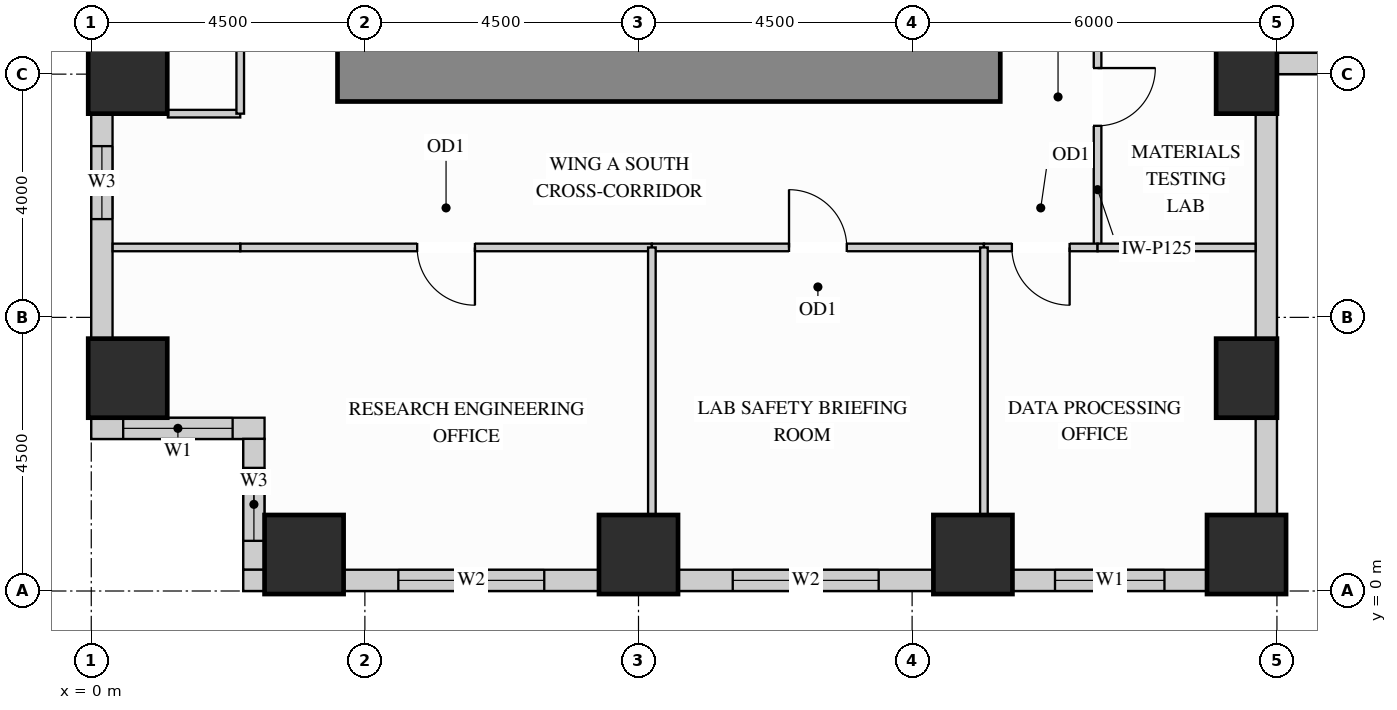
"""IFC4 building model, lengths in metres.
Left out: names, types, materials, properties, quantities, classifications, styles, units other than length and angle.
Written with IfcOpenShell. Run it as: python <this file> out.ifc"""

import sys

from ifc_helpers import new_model, si_unit, direction, frame, frame_2d, origin, origin_2d, place, context, subcontext, project, spatial, rectangle, extrude, source, transform, mapped, element, fill, save


model = new_model("IFC4")
c1 = context("Model", 3, precision=1e-05, world=origin(), true_north=direction((0.0, 1.0)))
c2 = subcontext(c1, "Body", "Model", "MODEL_VIEW")
j1 = project(units=[si_unit("LENGTHUNIT", "METRE"), si_unit("PLANEANGLEUNIT", "RADIAN")], contexts=[c1])
p1 = place(None, origin())
s1 = spatial("IfcSite", under=j1, at=p1, CompositionType="ELEMENT")
p2 = place(p1, origin())
s2 = spatial("IfcBuilding", under=s1, at=p2, CompositionType="ELEMENT")
p3 = place(p2, frame((0.0, 0.0, 36.9)))
s3 = spatial("IfcBuildingStorey", under=s2, at=p3, CompositionType="ELEMENT", Elevation=36.9)
m1 = source(origin(), c2, "Body", "SweptSolid", [
    extrude(rectangle(XDim=1.0, YDim=1.3, at=origin_2d()), origin(), (0.0, 0.0, 1.0), 3.38),
])
for number, where, z_axis, x_axis in (
    (1, (19.0, 3.5, 0.0), (0.0, 0.0, 1.0), (1.0, 0.0, 0.0)),
    (2, (19.0, 8.5, 0.0), (0.0, 0.0, 1.0), (1.0, 0.0, 0.0)),
):
    element("IfcColumn", number, at=place(p3, frame(where, z_axis=z_axis, x_axis=x_axis)), inside=s3, PredefinedType="COLUMN", context=c2, shape_type="MappedRepresentation", body=[
        mapped(m1, transform((0.0, 0.0, 0.0), x_axis=(1.0, 0.0, 0.0), y_axis=(0.0, 1.0, 0.0), z_axis=(0.0, 0.0, 1.0))),
    ])
m2 = source(origin(), c2, "Body", "SweptSolid", [
    extrude(rectangle(XDim=1.3, YDim=1.3, at=origin_2d()), origin(), (0.0, 0.0, 1.0), 3.38),
])
for number, where, z_axis, x_axis in (
    (3, (14.5, 0.6, 0.0), (0.0, 0.0, 1.0), (1.0, 0.0, 0.0)),
    (4, (19.0, 0.6, 0.0), (0.0, 0.0, 1.0), (1.0, 0.0, 0.0)),
    (5, (3.5, 0.6, 0.0), (0.0, 0.0, 1.0), (1.0, 0.0, 0.0)),
    (6, (9.0, 0.6, 0.0), (0.0, 0.0, 1.0), (1.0, 0.0, 0.0)),
    (7, (0.6, 3.5, 0.0), (0.0, 0.0, 1.0), (1.0, 0.0, 0.0)),
    (8, (0.6, 8.5, 0.0), (0.0, 0.0, 1.0), (1.0, 0.0, 0.0)),
):
    element("IfcColumn", number, at=place(p3, frame(where, z_axis=z_axis, x_axis=x_axis)), inside=s3, PredefinedType="COLUMN", context=c2, shape_type="MappedRepresentation", body=[
        mapped(m2, transform((0.0, 0.0, 0.0), x_axis=(1.0, 0.0, 0.0), y_axis=(0.0, 1.0, 0.0), z_axis=(0.0, 0.0, 1.0))),
    ])
m3 = source(origin(), c2, "Body", "SweptSolid", [
    extrude(rectangle(XDim=10.9, YDim=0.9, at=frame_2d((5.45, 0.0))), origin(), (0.0, 0.0, 1.0), 3.38),
])
p4 = place(p3, frame((4.05, 8.5, 0.0), z_axis=(0.0, 0.0, 1.0), x_axis=(1.0, 0.0, 0.0)))
e9 = element("IfcWall", 9, at=p4, inside=s3, PredefinedType="SHEAR", context=c2, shape_type="MappedRepresentation", body=[
    mapped(m3, transform((0.0, 0.0, 0.0), x_axis=(1.0, 0.0, 0.0), y_axis=(0.0, 1.0, 0.0), z_axis=(0.0, 0.0, 1.0))),
])
p5 = place(p3, frame((0.175, 7.852, 0.0), z_axis=(0.0, 0.0, 1.0), x_axis=(0.0, -1.0, 0.0)))
e10 = element("IfcWall", 10, at=p5, inside=s3, PredefinedType="SOLIDWALL", context=c2, shape_type="SweptSolid", body=[
    extrude(rectangle(XDim=3.704, YDim=0.35, at=frame_2d((1.852, 0.0))), origin(), (0.0, 0.0, 1.0), 2.51),
])
p6 = place(p5, frame((0.536, 0.0, 0.78)))
e11 = element("IfcOpeningElement", 11, at=p6, cuts=e10, PredefinedType="OPENING", context=c2, shape_type="SweptSolid", body=[
    extrude(rectangle(XDim=1.2, YDim=1.55, at=frame_2d((0.6, 0.775))), frame((0.0, 0.185, 0.0), z_axis=(0.0, -1.0, 0.0), x_axis=(1.0, 0.0, 0.0)), (0.0, 0.0, 1.0), 0.37),
])
p7 = place(p3, frame((0.0, 2.675, 0.0), z_axis=(0.0, 0.0, 1.0), x_axis=(1.0, 0.0, 0.0)))
e12 = element("IfcWall", 12, at=p7, inside=s3, PredefinedType="SOLIDWALL", context=c2, shape_type="SweptSolid", body=[
    extrude(rectangle(XDim=2.85, YDim=0.35, at=frame_2d((1.425, 0.0))), origin(), (0.0, 0.0, 1.0), 3.365),
])
p8 = place(p7, frame((0.525, 0.0, 0.78)))
e13 = element("IfcOpeningElement", 13, at=p8, cuts=e12, PredefinedType="OPENING", context=c2, shape_type="SweptSolid", body=[
    extrude(rectangle(XDim=1.8, YDim=2.1, at=frame_2d((0.9, 1.05))), frame((0.0, 0.185, 0.0), z_axis=(0.0, -1.0, 0.0), x_axis=(1.0, 0.0, 0.0)), (0.0, 0.0, 1.0), 0.37),
])
p9 = place(p3, frame((2.675, 2.502, 0.0), z_axis=(0.0, 0.0, 1.0), x_axis=(0.0, -1.0, 0.0)))
e14 = element("IfcWall", 14, at=p9, inside=s3, PredefinedType="SOLIDWALL", context=c2, shape_type="SweptSolid", body=[
    extrude(rectangle(XDim=2.154, YDim=0.35, at=frame_2d((1.077, 0.0))), origin(), (0.0, 0.0, 1.0), 3.365),
])
p10 = place(p9, frame((0.477, 0.0, 0.78)))
e15 = element("IfcOpeningElement", 15, at=p10, cuts=e14, PredefinedType="OPENING", context=c2, shape_type="SweptSolid", body=[
    extrude(rectangle(XDim=1.2, YDim=2.1, at=frame_2d((0.6, 1.05))), frame((0.0, 0.185, 0.0), z_axis=(0.0, -1.0, 0.0), x_axis=(1.0, 0.0, 0.0)), (0.0, 0.0, 1.0), 0.37),
])
m4 = source(origin(), c2, "Body", "SweptSolid", [
    extrude(rectangle(XDim=0.352, YDim=0.35, at=frame_2d((0.176, 0.0))), origin(), (0.0, 0.0, 1.0), 3.365),
])
p11 = place(p3, frame((2.5, 0.175, 0.0), z_axis=(0.0, 0.0, 1.0), x_axis=(1.0, 0.0, 0.0)))
e16 = element("IfcWall", 16, at=p11, inside=s3, PredefinedType="SOLIDWALL", context=c2, shape_type="MappedRepresentation", body=[
    mapped(m4, transform((0.0, 0.0, 0.0), x_axis=(1.0, 0.0, 0.0), y_axis=(0.0, 1.0, 0.0), z_axis=(0.0, 0.0, 1.0))),
])
p12 = place(p3, frame((4.148, 0.175, 0.0), z_axis=(0.0, 0.0, 1.0), x_axis=(1.0, 0.0, 0.0)))
e17 = element("IfcWall", 17, at=p12, inside=s3, PredefinedType="SOLIDWALL", context=c2, shape_type="SweptSolid", body=[
    extrude(rectangle(XDim=4.204, YDim=0.35, at=frame_2d((2.102, 0.0))), origin(), (0.0, 0.0, 1.0), 2.51),
])
p13 = place(p12, frame((0.902, 0.0, 0.78)))
e18 = element("IfcOpeningElement", 18, at=p13, cuts=e17, PredefinedType="OPENING", context=c2, shape_type="SweptSolid", body=[
    extrude(rectangle(XDim=2.4, YDim=1.55, at=frame_2d((1.2, 0.775))), frame((0.0, 0.185, 0.0), z_axis=(0.0, -1.0, 0.0), x_axis=(1.0, 0.0, 0.0)), (0.0, 0.0, 1.0), 0.37),
])
p14 = place(p3, frame((9.648, 0.175, 0.0), z_axis=(0.0, 0.0, 1.0), x_axis=(1.0, 0.0, 0.0)))
e19 = element("IfcWall", 19, at=p14, inside=s3, PredefinedType="SOLIDWALL", context=c2, shape_type="SweptSolid", body=[
    extrude(rectangle(XDim=4.204, YDim=0.35, at=frame_2d((2.102, 0.0))), origin(), (0.0, 0.0, 1.0), 2.51),
])
p15 = place(p14, frame((0.902, 0.0, 0.78)))
e20 = element("IfcOpeningElement", 20, at=p15, cuts=e19, PredefinedType="OPENING", context=c2, shape_type="SweptSolid", body=[
    extrude(rectangle(XDim=2.4, YDim=1.55, at=frame_2d((1.2, 0.775))), frame((0.0, 0.185, 0.0), z_axis=(0.0, -1.0, 0.0), x_axis=(1.0, 0.0, 0.0)), (0.0, 0.0, 1.0), 0.37),
])
p16 = place(p3, frame((15.148, 0.175, 0.0), z_axis=(0.0, 0.0, 1.0), x_axis=(1.0, 0.0, 0.0)))
e21 = element("IfcWall", 21, at=p16, inside=s3, PredefinedType="SOLIDWALL", context=c2, shape_type="SweptSolid", body=[
    extrude(rectangle(XDim=3.204, YDim=0.35, at=frame_2d((1.602, 0.0))), origin(), (0.0, 0.0, 1.0), 2.51),
])
p17 = place(p16, frame((0.702, 0.0, 0.78)))
e22 = element("IfcOpeningElement", 22, at=p17, cuts=e21, PredefinedType="OPENING", context=c2, shape_type="SweptSolid", body=[
    extrude(rectangle(XDim=1.8, YDim=1.55, at=frame_2d((0.9, 0.775))), frame((0.0, 0.185, 0.0), z_axis=(0.0, -1.0, 0.0), x_axis=(1.0, 0.0, 0.0)), (0.0, 0.0, 1.0), 0.37),
])
m5 = source(origin(), c2, "Body", "SweptSolid", [
    extrude(rectangle(XDim=1.604, YDim=0.35, at=frame_2d((0.802, 0.0))), origin(), (0.0, 0.0, 1.0), 2.51),
])
p18 = place(p3, frame((19.325, 1.248, 0.0), z_axis=(0.0, 0.0, 1.0), x_axis=(0.0, 1.0, 0.0)))
e23 = element("IfcWall", 23, at=p18, inside=s3, PredefinedType="SOLIDWALL", context=c2, shape_type="MappedRepresentation", body=[
    mapped(m5, transform((0.0, 0.0, 0.0), x_axis=(1.0, 0.0, 0.0), y_axis=(0.0, 1.0, 0.0), z_axis=(0.0, 0.0, 1.0))),
])
m6 = source(origin(), c2, "Body", "SweptSolid", [
    extrude(rectangle(XDim=3.704, YDim=0.35, at=frame_2d((1.852, 0.0))), origin(), (0.0, 0.0, 1.0), 2.51),
])
p19 = place(p3, frame((19.325, 4.148, 0.0), z_axis=(0.0, 0.0, 1.0), x_axis=(0.0, 1.0, 0.0)))
e24 = element("IfcWall", 24, at=p19, inside=s3, PredefinedType="SOLIDWALL", context=c2, shape_type="MappedRepresentation", body=[
    mapped(m6, transform((0.0, 0.0, 0.0), x_axis=(1.0, 0.0, 0.0), y_axis=(0.0, 1.0, 0.0), z_axis=(0.0, 0.0, 1.0))),
])
p20 = place(p3, frame((19.498, 8.675, 0.0), z_axis=(0.0, 0.0, 1.0), x_axis=(1.0, 0.0, 0.0)))
e25 = element("IfcWall", 25, at=p20, inside=s3, PredefinedType="SOLIDWALL", context=c2, shape_type="SweptSolid", body=[
    extrude(rectangle(XDim=3.404, YDim=0.35, at=frame_2d((1.702, 0.0))), origin(), (0.0, 0.0, 1.0), 3.365),
])
p21 = place(p20, frame((0.952, 0.0, 0.78)))
e26 = element("IfcOpeningElement", 26, at=p21, cuts=e25, PredefinedType="OPENING", context=c2, shape_type="SweptSolid", body=[
    extrude(rectangle(XDim=1.5, YDim=2.0, at=frame_2d((0.75, 1.0))), frame((0.0, 0.185, 0.0), z_axis=(0.0, -1.0, 0.0), x_axis=(1.0, 0.0, 0.0)), (0.0, 0.0, 1.0), 0.37),
])
p22 = place(p3, frame((16.55, 5.65, 0.0), z_axis=(0.0, 0.0, 1.0), x_axis=(0.0, 1.0, 0.0)))
e27 = element("IfcWall", 27, at=p22, inside=s3, PredefinedType="PARTITIONING", context=c2, shape_type="SweptSolid", body=[
    extrude(rectangle(XDim=4.95, YDim=0.125, at=frame_2d((2.475, 0.0))), origin(), (0.0, 0.0, 1.0), 3.365),
])
p23 = place(p22, frame((2.0, 0.0, 0.0)))
e28 = element("IfcOpeningElement", 28, at=p23, cuts=e27, PredefinedType="OPENING", context=c2, shape_type="SweptSolid", body=[
    extrude(rectangle(XDim=0.95, YDim=2.15, at=frame_2d((0.475, 1.075))), frame((0.0, 0.073, 0.0), z_axis=(0.0, -1.0, 0.0), x_axis=(1.0, 0.0, 0.0)), (0.0, 0.0, 1.0), 0.145),
])
m7 = source(origin(), c2, "Body", "SweptSolid", [
    extrude(rectangle(XDim=1.19, YDim=0.125, at=frame_2d((0.595, 0.0))), origin(), (0.0, 0.0, 1.0), 3.365),
])
p24 = place(p3, frame((1.26, 7.85, 0.0), z_axis=(0.0, 0.0, 1.0), x_axis=(1.0, 0.0, 0.0)))
e29 = element("IfcWall", 29, at=p24, inside=s3, PredefinedType="PARTITIONING", context=c2, shape_type="MappedRepresentation", body=[
    mapped(m7, transform((0.0, 0.0, 0.0), x_axis=(1.0, 0.0, 0.0), y_axis=(0.0, 1.0, 0.0), z_axis=(0.0, 0.0, 1.0))),
])
p25 = place(p3, frame((2.45, 5.65, 0.0), z_axis=(0.0, 0.0, 1.0), x_axis=(1.0, 0.0, 0.0)))
e30 = element("IfcWall", 30, at=p25, inside=s3, PredefinedType="PARTITIONING", context=c2, shape_type="SweptSolid", body=[
    extrude(rectangle(XDim=6.77, YDim=0.125, at=frame_2d((3.385, 0.0))), origin(), (0.0, 0.0, 1.0), 3.365),
])
p26 = place(p25, frame((2.91, 0.0, 0.0)))
e31 = element("IfcOpeningElement", 31, at=p26, cuts=e30, PredefinedType="OPENING", context=c2, shape_type="SweptSolid", body=[
    extrude(rectangle(XDim=0.95, YDim=2.15, at=frame_2d((0.475, 1.075))), frame((0.0, 0.073, 0.0), z_axis=(0.0, -1.0, 0.0), x_axis=(1.0, 0.0, 0.0)), (0.0, 0.0, 1.0), 0.145),
])
p27 = place(p3, frame((9.22, 5.65, 0.0), z_axis=(0.0, 0.0, 1.0), x_axis=(1.0, 0.0, 0.0)))
e32 = element("IfcWall", 32, at=p27, inside=s3, PredefinedType="PARTITIONING", context=c2, shape_type="SweptSolid", body=[
    extrude(rectangle(XDim=5.461, YDim=0.125, at=frame_2d((2.73, 0.0))), origin(), (0.0, 0.0, 1.0), 3.365),
])
p28 = place(p27, frame((2.256, 0.0, 0.0)))
e33 = element("IfcOpeningElement", 33, at=p28, cuts=e32, PredefinedType="OPENING", context=c2, shape_type="SweptSolid", body=[
    extrude(rectangle(XDim=0.95, YDim=2.15, at=frame_2d((0.475, 1.075))), frame((0.0, 0.073, 0.0), z_axis=(0.0, -1.0, 0.0), x_axis=(1.0, 0.0, 0.0)), (0.0, 0.0, 1.0), 0.145),
])
p29 = place(p3, frame((14.681, 5.65, 0.0), z_axis=(0.0, 0.0, 1.0), x_axis=(1.0, 0.0, 0.0)))
e34 = element("IfcWall", 34, at=p29, inside=s3, PredefinedType="PARTITIONING", context=c2, shape_type="SweptSolid", body=[
    extrude(rectangle(XDim=1.869, YDim=0.125, at=frame_2d((0.935, 0.0))), origin(), (0.0, 0.0, 1.0), 3.365),
])
p30 = place(p29, frame((0.459, 0.0, 0.0)))
e35 = element("IfcOpeningElement", 35, at=p30, cuts=e34, PredefinedType="OPENING", context=c2, shape_type="SweptSolid", body=[
    extrude(rectangle(XDim=0.95, YDim=2.15, at=frame_2d((0.475, 1.075))), frame((0.0, 0.073, 0.0), z_axis=(0.0, -1.0, 0.0), x_axis=(1.0, 0.0, 0.0)), (0.0, 0.0, 1.0), 0.145),
])
m8 = source(origin(), c2, "Body", "SweptSolid", [
    extrude(rectangle(XDim=2.098, YDim=0.125, at=frame_2d((1.049, 0.0))), origin(), (0.0, 0.0, 1.0), 3.365),
])
p31 = place(p3, frame((0.352, 5.65, 0.0), z_axis=(0.0, 0.0, 1.0), x_axis=(1.0, 0.0, 0.0)))
e36 = element("IfcWall", 36, at=p31, inside=s3, PredefinedType="PARTITIONING", context=c2, shape_type="MappedRepresentation", body=[
    mapped(m8, transform((0.0, 0.0, 0.0), x_axis=(1.0, 0.0, 0.0), y_axis=(0.0, 1.0, 0.0), z_axis=(0.0, 0.0, 1.0))),
])
m9 = source(origin(), c2, "Body", "SweptSolid", [
    extrude(rectangle(XDim=2.598, YDim=0.125, at=frame_2d((1.299, 0.0))), origin(), (0.0, 0.0, 1.0), 3.365),
])
p32 = place(p3, frame((16.55, 5.65, 0.0), z_axis=(0.0, 0.0, 1.0), x_axis=(1.0, 0.0, 0.0)))
e37 = element("IfcWall", 37, at=p32, inside=s3, PredefinedType="PARTITIONING", context=c2, shape_type="MappedRepresentation", body=[
    mapped(m9, transform((0.0, 0.0, 0.0), x_axis=(1.0, 0.0, 0.0), y_axis=(0.0, 1.0, 0.0), z_axis=(0.0, 0.0, 1.0))),
])
m10 = source(origin(), c2, "Body", "SweptSolid", [
    extrude(rectangle(XDim=4.39, YDim=0.125, at=frame_2d((2.195, 0.0))), origin(), (0.0, 0.0, 1.0), 3.365),
])
for number, where, z_axis, x_axis in (
    (38, (9.22, 1.26, 0.0), (0.0, 0.0, 1.0), (0.0, 1.0, 0.0)),
    (39, (14.681, 1.26, 0.0), (0.0, 0.0, 1.0), (0.0, 1.0, 0.0)),
):
    element("IfcWall", number, at=place(p3, frame(where, z_axis=z_axis, x_axis=x_axis)), inside=s3, PredefinedType="PARTITIONING", context=c2, shape_type="MappedRepresentation", body=[
        mapped(m10, transform((0.0, 0.0, 0.0), x_axis=(1.0, 0.0, 0.0), y_axis=(0.0, 1.0, 0.0), z_axis=(0.0, 0.0, 1.0))),
    ])
p33 = place(p3, frame((2.45, 7.85, 0.0), z_axis=(0.0, 0.0, 1.0), x_axis=(0.0, 1.0, 0.0)))
e40 = element("IfcWall", 40, at=p33, inside=s3, PredefinedType="PARTITIONING", context=c2, shape_type="SweptSolid", body=[
    extrude(rectangle(XDim=7.25, YDim=0.125, at=frame_2d((3.625, 0.0))), origin(), (0.0, 0.0, 1.0), 3.365),
])
p34 = place(p33, frame((3.15, 0.0, 0.0)))
e41 = element("IfcOpeningElement", 41, at=p34, cuts=e40, PredefinedType="OPENING", context=c2, shape_type="SweptSolid", body=[
    extrude(rectangle(XDim=0.95, YDim=2.15, at=frame_2d((0.475, 1.075))), frame((0.0, 0.073, 0.0), z_axis=(0.0, -1.0, 0.0), x_axis=(1.0, 0.0, 0.0)), (0.0, 0.0, 1.0), 0.145),
])
m11 = source(origin(), c2, "Body", "SweptSolid", [
    extrude(rectangle(XDim=0.95, YDim=2.15, at=frame_2d((0.475, 1.075))), frame((0.0, 0.025, 0.0), z_axis=(0.0, -1.0, 0.0), x_axis=(1.0, 0.0, 0.0)), (0.0, 0.0, 1.0), 0.05),
])
p35 = place(p23, origin())
e42 = element("IfcDoor", 42, at=p35, inside=s3, OperationType="SINGLE_SWING_RIGHT", PredefinedType="DOOR", context=c2, shape_type="MappedRepresentation", body=[
    mapped(m11, transform((0.0, 0.0, 0.0), x_axis=(1.0, 0.0, 0.0), y_axis=(0.0, 1.0, 0.0), z_axis=(0.0, 0.0, 1.0))),
])
fill(e28, e42)
p36 = place(p26, origin())
e43 = element("IfcDoor", 43, at=p36, inside=s3, OperationType="SINGLE_SWING_RIGHT", PredefinedType="DOOR", context=c2, shape_type="MappedRepresentation", body=[
    mapped(m11, transform((0.0, 0.0, 0.0), x_axis=(1.0, 0.0, 0.0), y_axis=(0.0, 1.0, 0.0), z_axis=(0.0, 0.0, 1.0))),
])
fill(e31, e43)
p37 = place(p28, origin())
e44 = element("IfcDoor", 44, at=p37, inside=s3, OperationType="SINGLE_SWING_LEFT", PredefinedType="DOOR", context=c2, shape_type="MappedRepresentation", body=[
    mapped(m11, transform((0.0, 0.0, 0.0), x_axis=(1.0, 0.0, 0.0), y_axis=(0.0, 1.0, 0.0), z_axis=(0.0, 0.0, 1.0))),
])
fill(e33, e44)
p38 = place(p30, origin())
e45 = element("IfcDoor", 45, at=p38, inside=s3, OperationType="SINGLE_SWING_RIGHT", PredefinedType="DOOR", context=c2, shape_type="MappedRepresentation", body=[
    mapped(m11, transform((0.0, 0.0, 0.0), x_axis=(1.0, 0.0, 0.0), y_axis=(0.0, 1.0, 0.0), z_axis=(0.0, 0.0, 1.0))),
])
fill(e35, e45)
m12 = source(origin(), c2, "Body", "SweptSolid", [
    extrude(rectangle(XDim=1.8, YDim=2.1, at=frame_2d((0.9, 1.05))), frame((0.0, 0.03, 0.0), z_axis=(0.0, -1.0, 0.0), x_axis=(1.0, 0.0, 0.0)), (0.0, 0.0, 1.0), 0.06),
])
p39 = place(p8, origin())
e46 = element("IfcWindow", 46, at=p39, inside=s3, PartitioningType="SINGLE_PANEL", PredefinedType="WINDOW", context=c2, shape_type="MappedRepresentation", body=[
    mapped(m12, transform((0.0, 0.0, 0.0), x_axis=(1.0, 0.0, 0.0), y_axis=(0.0, 1.0, 0.0), z_axis=(0.0, 0.0, 1.0))),
])
fill(e13, e46)
m13 = source(origin(), c2, "Body", "SweptSolid", [
    extrude(rectangle(XDim=1.8, YDim=1.55, at=frame_2d((0.9, 0.775))), frame((0.0, 0.03, 0.0), z_axis=(0.0, -1.0, 0.0), x_axis=(1.0, 0.0, 0.0)), (0.0, 0.0, 1.0), 0.06),
])
p40 = place(p17, origin())
e47 = element("IfcWindow", 47, at=p40, inside=s3, PartitioningType="SINGLE_PANEL", PredefinedType="WINDOW", context=c2, shape_type="MappedRepresentation", body=[
    mapped(m13, transform((0.0, 0.0, 0.0), x_axis=(1.0, 0.0, 0.0), y_axis=(0.0, 1.0, 0.0), z_axis=(0.0, 0.0, 1.0))),
])
fill(e22, e47)
m14 = source(origin(), c2, "Body", "SweptSolid", [
    extrude(rectangle(XDim=2.4, YDim=1.55, at=frame_2d((1.2, 0.775))), frame((0.0, 0.03, 0.0), z_axis=(0.0, -1.0, 0.0), x_axis=(1.0, 0.0, 0.0)), (0.0, 0.0, 1.0), 0.06),
])
p41 = place(p13, origin())
e48 = element("IfcWindow", 48, at=p41, inside=s3, PartitioningType="SINGLE_PANEL", PredefinedType="WINDOW", context=c2, shape_type="MappedRepresentation", body=[
    mapped(m14, transform((0.0, 0.0, 0.0), x_axis=(1.0, 0.0, 0.0), y_axis=(0.0, 1.0, 0.0), z_axis=(0.0, 0.0, 1.0))),
])
fill(e18, e48)
p42 = place(p15, origin())
e49 = element("IfcWindow", 49, at=p42, inside=s3, PartitioningType="SINGLE_PANEL", PredefinedType="WINDOW", context=c2, shape_type="MappedRepresentation", body=[
    mapped(m14, transform((0.0, 0.0, 0.0), x_axis=(1.0, 0.0, 0.0), y_axis=(0.0, 1.0, 0.0), z_axis=(0.0, 0.0, 1.0))),
])
fill(e20, e49)
m15 = source(origin(), c2, "Body", "SweptSolid", [
    extrude(rectangle(XDim=1.2, YDim=1.55, at=frame_2d((0.6, 0.775))), frame((0.0, 0.03, 0.0), z_axis=(0.0, -1.0, 0.0), x_axis=(1.0, 0.0, 0.0)), (0.0, 0.0, 1.0), 0.06),
])
p43 = place(p6, origin())
e50 = element("IfcWindow", 50, at=p43, inside=s3, PartitioningType="SINGLE_PANEL", PredefinedType="WINDOW", context=c2, shape_type="MappedRepresentation", body=[
    mapped(m15, transform((0.0, 0.0, 0.0), x_axis=(1.0, 0.0, 0.0), y_axis=(0.0, 1.0, 0.0), z_axis=(0.0, 0.0, 1.0))),
])
fill(e11, e50)
m16 = source(origin(), c2, "Body", "SweptSolid", [
    extrude(rectangle(XDim=1.2, YDim=2.1, at=frame_2d((0.6, 1.05))), frame((0.0, 0.03, 0.0), z_axis=(0.0, -1.0, 0.0), x_axis=(1.0, 0.0, 0.0)), (0.0, 0.0, 1.0), 0.06),
])
p44 = place(p10, origin())
e51 = element("IfcWindow", 51, at=p44, inside=s3, PartitioningType="SINGLE_PANEL", PredefinedType="WINDOW", context=c2, shape_type="MappedRepresentation", body=[
    mapped(m16, transform((0.0, 0.0, 0.0), x_axis=(1.0, 0.0, 0.0), y_axis=(0.0, 1.0, 0.0), z_axis=(0.0, 0.0, 1.0))),
])
fill(e15, e51)
save(model, sys.argv[1])
